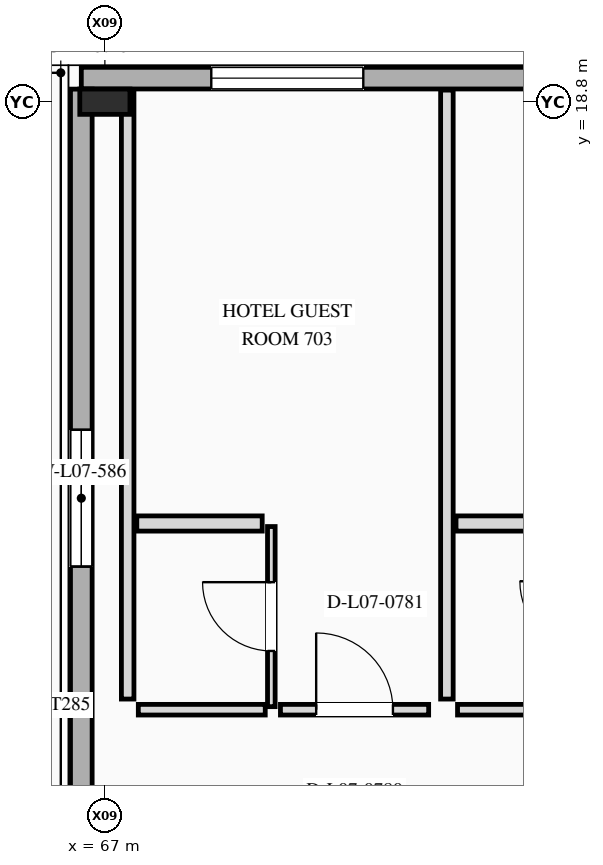
"""IFC4 building model, lengths in metres.
Left out: names, types, materials, properties, quantities, classifications, styles, units other than length and angle.
Written with IfcOpenShell. Run it as: python <this file> out.ifc"""

import sys

from ifc_helpers import new_model, si_unit, direction, frame, frame_2d, origin, origin_2d, place, context, subcontext, project, spatial, rectangle, i_section, extrude, element, fill, save


model = new_model("IFC4")
c1 = context("Model", 3, precision=1e-05, world=origin(), true_north=direction((0.0, 1.0)))
c2 = subcontext(c1, "Body", "Model", "MODEL_VIEW")
j1 = project(units=[si_unit("LENGTHUNIT", "METRE"), si_unit("PLANEANGLEUNIT", "RADIAN")], contexts=[c1])
p1 = place(None, origin())
s1 = spatial("IfcSite", under=j1, at=p1, CompositionType="ELEMENT")
p2 = place(p1, origin())
s2 = spatial("IfcBuilding", under=s1, at=p2, CompositionType="ELEMENT")
p3 = place(p2, frame((0.0, 0.0, 30.6)))
s3 = spatial("IfcBuildingStorey", under=s2, at=p3, CompositionType="ELEMENT", Elevation=30.6)
p4 = place(p3, frame((67.0, 18.8, 0.0), z_axis=(0.0, 0.0, 1.0), x_axis=(0.0, 1.0, 0.0)))
e1 = element("IfcColumn", 1, at=p4, inside=s3, PredefinedType="COLUMN", context=c2, shape_type="SweptSolid", body=[
    extrude(i_section(OverallWidth=0.333, OverallDepth=0.66, WebThickness=0.024, FlangeThickness=0.044, at=origin_2d()), origin(), (0.0, 0.0, 1.0), 3.5),
])
p5 = place(p3, frame((76.0, 19.11, 0.0), z_axis=(0.0, 0.0, 1.0), x_axis=(-1.0, 0.0, 0.0)))
e2 = element("IfcWall", 2, at=p5, inside=s3, PredefinedType="STANDARD", context=c2, shape_type="SweptSolid", body=[
    extrude(rectangle(XDim=9.31, YDim=0.285, at=frame_2d((4.655, 0.0))), origin(), (0.0, 0.0, 1.0), 3.5),
])
p6 = place(p5, frame((5.6, 0.0, 0.85)))
e3 = element("IfcOpeningElement", 3, at=p6, cuts=e2, PredefinedType="OPENING", context=c2, shape_type="SweptSolid", body=[
    extrude(rectangle(XDim=2.0, YDim=1.65, at=frame_2d((1.0, 0.825))), frame((0.0, 0.152, 0.0), z_axis=(0.0, -1.0, 0.0), x_axis=(1.0, 0.0, 0.0)), (0.0, 0.0, 1.0), 0.305),
])
p7 = place(p5, frame((1.4, 0.0, 0.85)))
e4 = element("IfcOpeningElement", 4, at=p7, cuts=e2, PredefinedType="OPENING", context=c2, shape_type="SweptSolid", body=[
    extrude(rectangle(XDim=2.0, YDim=1.65, at=frame_2d((1.0, 0.825))), frame((0.0, 0.152, 0.0), z_axis=(0.0, -1.0, 0.0), x_axis=(1.0, 0.0, 0.0)), (0.0, 0.0, 1.0), 0.305),
])
p8 = place(p3, frame((66.69, 18.966, 0.0), z_axis=(0.0, 0.0, 1.0), x_axis=(0.0, -1.0, 0.0)))
e5 = element("IfcWall", 5, at=p8, inside=s3, PredefinedType="STANDARD", context=c2, shape_type="SweptSolid", body=[
    extrude(rectangle(XDim=10.766, YDim=0.285, at=frame_2d((5.383, 0.0))), origin(), (0.0, 0.0, 1.0), 3.5),
])
p9 = place(p8, frame((4.483, 0.0, 0.88)))
e6 = element("IfcOpeningElement", 6, at=p9, cuts=e5, PredefinedType="OPENING", context=c2, shape_type="SweptSolid", body=[
    extrude(rectangle(XDim=1.8, YDim=1.8, at=frame_2d((0.9, 0.9))), frame((0.0, 0.152, 0.0), z_axis=(0.0, -1.0, 0.0), x_axis=(1.0, 0.0, 0.0)), (0.0, 0.0, 1.0), 0.305),
])
p10 = place(p3, frame((67.44, 10.8, 0.0), z_axis=(0.0, 0.0, 1.0), x_axis=(1.0, 0.0, 0.0)))
e7 = element("IfcWall", 7, at=p10, inside=s3, PredefinedType="PARTITIONING", context=c2, shape_type="SweptSolid", body=[
    extrude(rectangle(XDim=1.67, YDim=0.14, at=frame_2d((0.835, 0.0))), origin(), (0.0, 0.0, 1.0), 3.2),
])
p11 = place(p3, frame((69.31, 10.8, 0.0), z_axis=(0.0, 0.0, 1.0), x_axis=(1.0, 0.0, 0.0)))
e8 = element("IfcWall", 8, at=p11, inside=s3, PredefinedType="PARTITIONING", context=c2, shape_type="SweptSolid", body=[
    extrude(rectangle(XDim=1.95, YDim=0.14, at=frame_2d((0.975, 0.0))), origin(), (0.0, 0.0, 1.0), 3.2),
])
p12 = place(p11, frame((0.47, 0.0, 0.0)))
e9 = element("IfcOpeningElement", 9, at=p12, cuts=e8, PredefinedType="OPENING", context=c2, shape_type="SweptSolid", body=[
    extrude(rectangle(XDim=1.01, YDim=2.35, at=frame_2d((0.505, 1.175))), frame((0.0, 0.08, 0.0), z_axis=(0.0, -1.0, 0.0), x_axis=(1.0, 0.0, 0.0)), (0.0, 0.0, 1.0), 0.16),
])
p13 = place(p3, frame((67.3, 10.94, 0.0), z_axis=(0.0, 0.0, 1.0), x_axis=(0.0, 1.0, 0.0)))
e10 = element("IfcWall", 10, at=p13, inside=s3, PredefinedType="PARTITIONING", context=c2, shape_type="SweptSolid", body=[
    extrude(rectangle(XDim=8.012, YDim=0.165, at=frame_2d((4.006, 0.0))), origin(), (0.0, 0.0, 1.0), 2.529),
])
p14 = place(p3, frame((71.5, 10.94, 0.0), z_axis=(0.0, 0.0, 1.0), x_axis=(0.0, 1.0, 0.0)))
e11 = element("IfcWall", 11, at=p14, inside=s3, PredefinedType="PARTITIONING", context=c2, shape_type="SweptSolid", body=[
    extrude(rectangle(XDim=8.012, YDim=0.165, at=frame_2d((4.006, 0.0))), origin(), (0.0, 0.0, 1.0), 2.613),
])
p15 = place(p3, frame((69.19, 10.84, 0.0), z_axis=(0.0, 0.0, 1.0), x_axis=(0.0, 1.0, 0.0)))
e12 = element("IfcWall", 12, at=p15, inside=s3, PredefinedType="PARTITIONING", context=c2, shape_type="SweptSolid", body=[
    extrude(rectangle(XDim=2.37, YDim=0.1, at=frame_2d((1.185, 0.0))), origin(), (0.0, 0.0, 1.0), 2.808),
])
p16 = place(p15, frame((0.733, 0.0, 0.0)))
e13 = element("IfcOpeningElement", 13, at=p16, cuts=e12, PredefinedType="OPENING", context=c2, shape_type="SweptSolid", body=[
    extrude(rectangle(XDim=0.905, YDim=2.1, at=frame_2d((0.453, 1.05))), frame((0.0, 0.06, 0.0), z_axis=(0.0, -1.0, 0.0), x_axis=(1.0, 0.0, 0.0)), (0.0, 0.0, 1.0), 0.12),
])
p17 = place(p3, frame((67.42, 13.25, 0.0), z_axis=(0.0, 0.0, 1.0), x_axis=(1.0, 0.0, 0.0)))
e14 = element("IfcWall", 14, at=p17, inside=s3, PredefinedType="PLUMBINGWALL", context=c2, shape_type="SweptSolid", body=[
    extrude(rectangle(XDim=1.65, YDim=0.2, at=frame_2d((0.825, 0.0))), origin(), (0.0, 0.0, 1.0), 3.2),
])
p18 = place(p3, frame((71.64, 10.8, 0.0), z_axis=(0.0, 0.0, 1.0), x_axis=(1.0, 0.0, 0.0)))
e15 = element("IfcWall", 15, at=p18, inside=s3, PredefinedType="PARTITIONING", context=c2, shape_type="SweptSolid", body=[
    extrude(rectangle(XDim=1.67, YDim=0.14, at=frame_2d((0.835, 0.0))), origin(), (0.0, 0.0, 1.0), 3.2),
])
p19 = place(p3, frame((71.62, 13.25, 0.0), z_axis=(0.0, 0.0, 1.0), x_axis=(1.0, 0.0, 0.0)))
e16 = element("IfcWall", 16, at=p19, inside=s3, PredefinedType="PLUMBINGWALL", context=c2, shape_type="SweptSolid", body=[
    extrude(rectangle(XDim=1.65, YDim=0.2, at=frame_2d((0.825, 0.0))), origin(), (0.0, 0.0, 1.0), 3.2),
])
p20 = place(p6, origin())
e17 = element("IfcWindow", 17, at=p20, inside=s3, PartitioningType="SINGLE_PANEL", PredefinedType="WINDOW", context=c2, shape_type="SweptSolid", body=[
    extrude(rectangle(XDim=2.0, YDim=1.65, at=frame_2d((1.0, 0.825))), frame((0.0, 0.03, 0.0), z_axis=(0.0, -1.0, 0.0), x_axis=(1.0, 0.0, 0.0)), (0.0, 0.0, 1.0), 0.06),
])
fill(e3, e17)
p21 = place(p9, origin())
e18 = element("IfcWindow", 18, at=p21, inside=s3, PartitioningType="SINGLE_PANEL", PredefinedType="WINDOW", context=c2, shape_type="SweptSolid", body=[
    extrude(rectangle(XDim=1.8, YDim=1.8, at=frame_2d((0.9, 0.9))), frame((0.0, 0.03, 0.0), z_axis=(0.0, -1.0, 0.0), x_axis=(1.0, 0.0, 0.0)), (0.0, 0.0, 1.0), 0.06),
])
fill(e6, e18)
p22 = place(p12, origin())
e19 = element("IfcDoor", 19, at=p22, inside=s3, OperationType="SINGLE_SWING_LEFT", PredefinedType="DOOR", context=c2, shape_type="SweptSolid", body=[
    extrude(rectangle(XDim=1.01, YDim=2.35, at=frame_2d((0.505, 1.175))), frame((0.0, 0.025, 0.0), z_axis=(0.0, -1.0, 0.0), x_axis=(1.0, 0.0, 0.0)), (0.0, 0.0, 1.0), 0.05),
])
fill(e9, e19)
p23 = place(p16, origin())
e20 = element("IfcDoor", 20, at=p23, inside=s3, OperationType="SINGLE_SWING_RIGHT", PredefinedType="DOOR", context=c2, shape_type="SweptSolid", body=[
    extrude(rectangle(XDim=0.905, YDim=2.1, at=frame_2d((0.453, 1.05))), frame((0.0, 0.025, 0.0), z_axis=(0.0, -1.0, 0.0), x_axis=(1.0, 0.0, 0.0)), (0.0, 0.0, 1.0), 0.05),
])
fill(e13, e20)
save(model, sys.argv[1])
